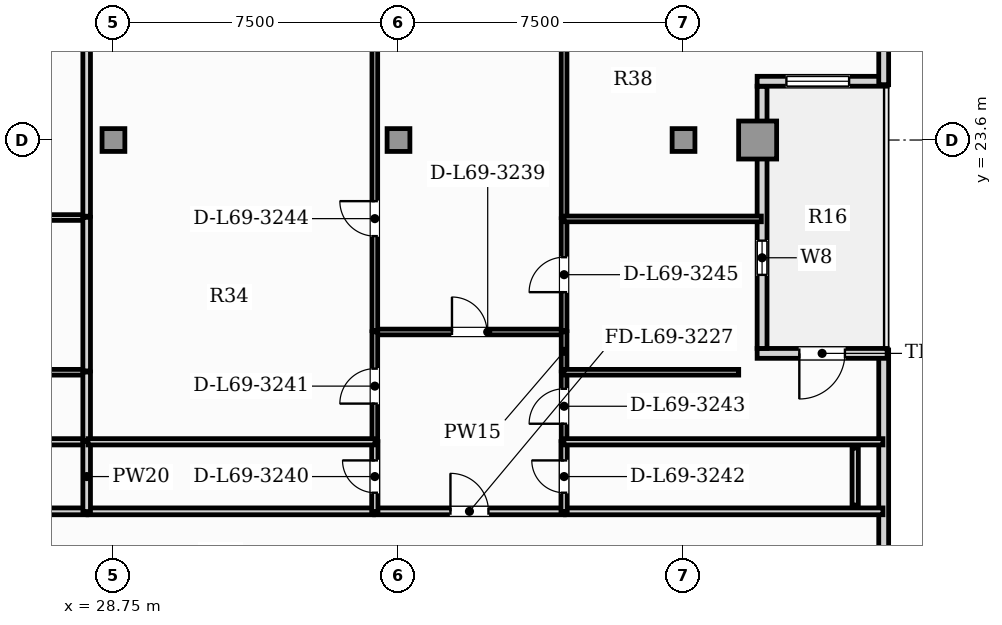
"""IFC4 building model, lengths in metres.
Left out: names, types, materials, properties, quantities, classifications, styles, units other than length and angle.
Written with IfcOpenShell. Run it as: python <this file> out.ifc"""

import sys

from ifc_helpers import new_model, si_unit, direction, frame, frame_2d, origin, origin_2d, place, context, subcontext, project, spatial, rectangle, hollow_rectangle, extrude, element, fill, save


model = new_model("IFC4")
c1 = context("Model", 3, precision=1e-05, world=origin(), true_north=direction((0.0, 1.0)))
c2 = subcontext(c1, "Body", "Model", "MODEL_VIEW")
j1 = project(units=[si_unit("LENGTHUNIT", "METRE"), si_unit("PLANEANGLEUNIT", "RADIAN")], contexts=[c1])
p1 = place(None, origin())
s1 = spatial("IfcSite", under=j1, at=p1, CompositionType="ELEMENT")
p2 = place(p1, origin())
s2 = spatial("IfcBuilding", under=s1, at=p2, CompositionType="ELEMENT")
p3 = place(p2, frame((0.0, 0.0, 281.05)))
s3 = spatial("IfcBuildingStorey", under=s2, at=p3, CompositionType="ELEMENT", Elevation=281.05)
p4 = place(p3, frame((45.7, 23.6, 0.0), z_axis=(0.0, 0.0, 1.0), x_axis=(1.0, 0.0, 0.0)))
e1 = element("IfcColumn", 1, at=p4, inside=s3, PredefinedType="USERDEFINED", context=c2, shape_type="SweptSolid", body=[
    extrude(hollow_rectangle(XDim=1.0, YDim=1.0, WallThickness=0.06, at=origin_2d()), origin(), (0.0, 0.0, 1.0), 3.85),
])
for number, where, z_axis, x_axis in (
    (2, (28.75, 23.6, 0.0), (0.0, 0.0, 1.0), (1.0, 0.0, 0.0)),
    (3, (36.25, 23.6, 0.0), (0.0, 0.0, 1.0), (1.0, 0.0, 0.0)),
    (4, (43.75, 23.6, 0.0), (0.0, 0.0, 1.0), (1.0, 0.0, 0.0)),
):
    element("IfcColumn", number, at=place(p3, frame(where, z_axis=z_axis, x_axis=x_axis)), inside=s3, PredefinedType="COLUMN", context=c2, shape_type="SweptSolid", body=[
        extrude(rectangle(XDim=0.6, YDim=0.6, at=origin_2d()), origin(), (0.0, 0.0, 1.0), 3.85),
    ])
p5 = place(p3, frame((49.017, 3.24, 0.0), z_axis=(0.0, 0.0, 1.0), x_axis=(0.0, 1.0, 0.0)))
e5 = element("IfcWall", 5, at=p5, inside=s3, PredefinedType="SOLIDWALL", context=c2, shape_type="SweptSolid", body=[
    extrude(rectangle(XDim=14.836, YDim=0.26, at=frame_2d((7.418, 0.0))), origin(), (0.0, 0.0, 1.0), 3.65),
])
p6 = place(p3, frame((49.107, 17.986, 0.0), z_axis=(0.0, 0.0, 1.0), x_axis=(-1.0, 0.0, 0.0)))
e6 = element("IfcWall", 6, at=p6, inside=s3, PredefinedType="SOLIDWALL", context=c2, shape_type="SweptSolid", body=[
    extrude(rectangle(XDim=3.42, YDim=0.26, at=frame_2d((1.71, 0.0))), origin(), (0.0, 0.0, 1.0), 3.65),
])
p7 = place(p6, frame((1.11, 0.0, 0.0)))
e7 = element("IfcOpeningElement", 7, at=p7, cuts=e6, PredefinedType="OPENING", context=c2, shape_type="SweptSolid", body=[
    extrude(rectangle(XDim=1.2, YDim=2.2, at=frame_2d((0.6, 1.1))), frame((0.0, 0.14, 0.0), z_axis=(0.0, -1.0, 0.0), x_axis=(1.0, 0.0, 0.0)), (0.0, 0.0, 1.0), 0.28),
])
p8 = place(p3, frame((45.817, 18.116, 0.0), z_axis=(0.0, 0.0, 1.0), x_axis=(0.0, 1.0, 0.0)))
e8 = element("IfcWall", 8, at=p8, inside=s3, PredefinedType="SOLIDWALL", context=c2, shape_type="SweptSolid", body=[
    extrude(rectangle(XDim=6.9, YDim=0.26, at=frame_2d((3.45, 0.0))), origin(), (0.0, 0.0, 1.0), 3.19),
])
p9 = place(p8, frame((1.936, 0.0, 0.85)))
e9 = element("IfcOpeningElement", 9, at=p9, cuts=e8, PredefinedType="OPENING", context=c2, shape_type="SweptSolid", body=[
    extrude(rectangle(XDim=0.9, YDim=1.4, at=frame_2d((0.45, 0.7))), frame((0.0, 0.14, 0.0), z_axis=(0.0, -1.0, 0.0), x_axis=(1.0, 0.0, 0.0)), (0.0, 0.0, 1.0), 0.28),
])
p10 = place(p3, frame((45.687, 25.146, 0.0), z_axis=(0.0, 0.0, 1.0), x_axis=(1.0, 0.0, 0.0)))
e10 = element("IfcWall", 10, at=p10, inside=s3, PredefinedType="SOLIDWALL", context=c2, shape_type="SweptSolid", body=[
    extrude(rectangle(XDim=3.42, YDim=0.26, at=frame_2d((1.71, 0.0))), origin(), (0.0, 0.0, 1.0), 3.65),
])
p11 = place(p10, frame((0.77, 0.0, 0.88)))
e11 = element("IfcOpeningElement", 11, at=p11, cuts=e10, PredefinedType="OPENING", context=c2, shape_type="SweptSolid", body=[
    extrude(rectangle(XDim=1.65, YDim=2.0, at=frame_2d((0.825, 1.0))), frame((0.0, 0.14, 0.0), z_axis=(0.0, -1.0, 0.0), x_axis=(1.0, 0.0, 0.0)), (0.0, 0.0, 1.0), 0.28),
])
p12 = place(p3, frame((49.017, 25.056, 0.0), z_axis=(0.0, 0.0, 1.0), x_axis=(0.0, 1.0, 0.0)))
e12 = element("IfcWall", 12, at=p12, inside=s3, PredefinedType="SOLIDWALL", context=c2, shape_type="SweptSolid", body=[
    extrude(rectangle(XDim=6.436, YDim=0.26, at=frame_2d((3.218, 0.0))), origin(), (0.0, 0.0, 1.0), 3.65),
])
p13 = place(p12, frame((2.244, 0.0, 0.95)))
e13 = element("IfcOpeningElement", 13, at=p13, cuts=e12, PredefinedType="OPENING", context=c2, shape_type="SweptSolid", body=[
    extrude(rectangle(XDim=0.9, YDim=1.5, at=frame_2d((0.45, 0.75))), frame((0.0, 0.14, 0.0), z_axis=(0.0, -1.0, 0.0), x_axis=(1.0, 0.0, 0.0)), (0.0, 0.0, 1.0), 0.28),
])
p14 = place(p12, frame((4.016, 0.0, 0.88)))
e14 = element("IfcOpeningElement", 14, at=p14, cuts=e12, PredefinedType="OPENING", context=c2, shape_type="SweptSolid", body=[
    extrude(rectangle(XDim=1.65, YDim=2.0, at=frame_2d((0.825, 1.0))), frame((0.0, 0.14, 0.0), z_axis=(0.0, -1.0, 0.0), x_axis=(1.0, 0.0, 0.0)), (0.0, 0.0, 1.0), 0.28),
])
p15 = place(p3, frame((21.119, 13.83, 0.0), z_axis=(0.0, 0.0, 1.0), x_axis=(1.0, 0.0, 0.0)))
e15 = element("IfcWall", 15, at=p15, inside=s3, PredefinedType="PARTITIONING", context=c2, shape_type="SweptSolid", body=[
    extrude(rectangle(XDim=6.931, YDim=0.18, at=frame_2d((3.465, 0.0))), origin(), (0.0, 0.0, 1.0), 3.65),
])
p16 = place(p3, frame((35.622, 13.83, 0.0), z_axis=(0.0, 0.0, 1.0), x_axis=(1.0, 0.0, 0.0)))
e16 = element("IfcWall", 16, at=p16, inside=s3, PredefinedType="PARTITIONING", context=c2, shape_type="SweptSolid", body=[
    extrude(rectangle(XDim=4.99, YDim=0.18, at=frame_2d((2.495, 0.0))), origin(), (0.0, 0.0, 1.0), 3.65),
])
p17 = place(p16, frame((1.995, 0.0, 0.0)))
e17 = element("IfcOpeningElement", 17, at=p17, cuts=e16, PredefinedType="OPENING", context=c2, shape_type="SweptSolid", body=[
    extrude(rectangle(XDim=1.0, YDim=2.15, at=frame_2d((0.5, 1.075))), frame((0.0, 0.1, 0.0), z_axis=(0.0, -1.0, 0.0), x_axis=(1.0, 0.0, 0.0)), (0.0, 0.0, 1.0), 0.2),
])
p18 = place(p3, frame((28.08, 13.83, 0.0), z_axis=(0.0, 0.0, 1.0), x_axis=(1.0, 0.0, 0.0)))
e18 = element("IfcWall", 18, at=p18, inside=s3, PredefinedType="PARTITIONING", context=c2, shape_type="SweptSolid", body=[
    extrude(rectangle(XDim=7.512, YDim=0.18, at=frame_2d((3.756, 0.0))), origin(), (0.0, 0.0, 1.0), 3.65),
])
p19 = place(p3, frame((40.642, 13.83, 0.0), z_axis=(0.0, 0.0, 1.0), x_axis=(1.0, 0.0, 0.0)))
e19 = element("IfcWall", 19, at=p19, inside=s3, PredefinedType="PARTITIONING", context=c2, shape_type="SweptSolid", body=[
    extrude(rectangle(XDim=8.355, YDim=0.18, at=frame_2d((4.177, 0.0))), origin(), (0.0, 0.0, 1.0), 3.65),
])
p20 = place(p3, frame((21.079, 15.66, 0.0), z_axis=(0.0, 0.0, 1.0), x_axis=(1.0, 0.0, 0.0)))
e20 = element("IfcWall", 20, at=p20, inside=s3, PredefinedType="PLUMBINGWALL", context=c2, shape_type="SweptSolid", body=[
    extrude(rectangle(XDim=6.971, YDim=0.165, at=frame_2d((3.485, 0.0))), origin(), (0.0, 0.0, 1.0), 3.65),
])
p21 = place(p3, frame((28.045, 13.825, 0.0), z_axis=(0.0, 0.0, 1.0), x_axis=(0.0, 1.0, 0.0)))
e21 = element("IfcWall", 21, at=p21, inside=s3, PredefinedType="PARTITIONING", context=c2, shape_type="SweptSolid", body=[
    extrude(rectangle(XDim=1.84, YDim=0.2, at=frame_2d((0.92, 0.0))), origin(), (0.0, 0.0, 1.0), 3.65),
])
p22 = place(p3, frame((21.079, 17.49, 0.0), z_axis=(0.0, 0.0, 1.0), x_axis=(1.0, 0.0, 0.0)))
e22 = element("IfcWall", 22, at=p22, inside=s3, PredefinedType="PARTITIONING", context=c2, shape_type="SweptSolid", body=[
    extrude(rectangle(XDim=6.971, YDim=0.15, at=frame_2d((3.485, 0.0))), origin(), (0.0, 0.0, 1.0), 3.65),
])
p23 = place(p3, frame((28.045, 15.695, 0.0), z_axis=(0.0, 0.0, 1.0), x_axis=(0.0, 1.0, 0.0)))
e23 = element("IfcWall", 23, at=p23, inside=s3, PredefinedType="PARTITIONING", context=c2, shape_type="SweptSolid", body=[
    extrude(rectangle(XDim=1.8, YDim=0.2, at=frame_2d((0.9, 0.0))), origin(), (0.0, 0.0, 1.0), 3.65),
])
p24 = place(p3, frame((21.079, 21.561, 0.0), z_axis=(0.0, 0.0, 1.0), x_axis=(1.0, 0.0, 0.0)))
e24 = element("IfcWall", 24, at=p24, inside=s3, PredefinedType="PARTITIONING", context=c2, shape_type="SweptSolid", body=[
    extrude(rectangle(XDim=6.971, YDim=0.15, at=frame_2d((3.485, 0.0))), origin(), (0.0, 0.0, 1.0), 3.65),
])
p25 = place(p3, frame((28.045, 17.525, 0.0), z_axis=(0.0, 0.0, 1.0), x_axis=(0.0, 1.0, 0.0)))
e25 = element("IfcWall", 25, at=p25, inside=s3, PredefinedType="PARTITIONING", context=c2, shape_type="SweptSolid", body=[
    extrude(rectangle(XDim=4.041, YDim=0.2, at=frame_2d((2.021, 0.0))), origin(), (0.0, 0.0, 1.0), 3.65),
])
p26 = place(p3, frame((28.045, 21.596, 0.0), z_axis=(0.0, 0.0, 1.0), x_axis=(0.0, 1.0, 0.0)))
e26 = element("IfcWall", 26, at=p26, inside=s3, PredefinedType="PARTITIONING", context=c2, shape_type="SweptSolid", body=[
    extrude(rectangle(XDim=5.369, YDim=0.2, at=frame_2d((2.685, 0.0))), origin(), (0.0, 0.0, 1.0), 3.65),
])
p27 = place(p3, frame((35.622, 18.55, 0.0), z_axis=(0.0, 0.0, 1.0), x_axis=(1.0, 0.0, 0.0)))
e27 = element("IfcWall", 27, at=p27, inside=s3, PredefinedType="PARTITIONING", context=c2, shape_type="SweptSolid", body=[
    extrude(rectangle(XDim=4.99, YDim=0.15, at=frame_2d((2.495, 0.0))), origin(), (0.0, 0.0, 1.0), 3.65),
])
p28 = place(p27, frame((2.035, 0.0, 0.0)))
e28 = element("IfcOpeningElement", 28, at=p28, cuts=e27, PredefinedType="OPENING", context=c2, shape_type="SweptSolid", body=[
    extrude(rectangle(XDim=0.92, YDim=2.1, at=frame_2d((0.46, 1.05))), frame((0.0, 0.085, 0.0), z_axis=(0.0, -1.0, 0.0), x_axis=(1.0, 0.0, 0.0)), (0.0, 0.0, 1.0), 0.17),
])
p29 = place(p3, frame((35.627, 13.825, 0.0), z_axis=(0.0, 0.0, 1.0), x_axis=(0.0, 1.0, 0.0)))
e29 = element("IfcWall", 29, at=p29, inside=s3, PredefinedType="PLUMBINGWALL", context=c2, shape_type="SweptSolid", body=[
    extrude(rectangle(XDim=1.84, YDim=0.165, at=frame_2d((0.92, 0.0))), origin(), (0.0, 0.0, 1.0), 3.65),
])
p30 = place(p29, frame((0.495, 0.0, 0.0)))
e30 = element("IfcOpeningElement", 30, at=p30, cuts=e29, PredefinedType="OPENING", context=c2, shape_type="SweptSolid", body=[
    extrude(rectangle(XDim=0.85, YDim=2.1, at=frame_2d((0.425, 1.05))), frame((0.0, 0.093, 0.0), z_axis=(0.0, -1.0, 0.0), x_axis=(1.0, 0.0, 0.0)), (0.0, 0.0, 1.0), 0.185),
])
p31 = place(p3, frame((35.627, 15.695, 0.0), z_axis=(0.0, 0.0, 1.0), x_axis=(0.0, 1.0, 0.0)))
e31 = element("IfcWall", 31, at=p31, inside=s3, PredefinedType="PARTITIONING", context=c2, shape_type="SweptSolid", body=[
    extrude(rectangle(XDim=2.859, YDim=0.15, at=frame_2d((1.43, 0.0))), origin(), (0.0, 0.0, 1.0), 3.65),
])
p32 = place(p31, frame((0.97, 0.0, 0.0)))
e32 = element("IfcOpeningElement", 32, at=p32, cuts=e31, PredefinedType="OPENING", context=c2, shape_type="SweptSolid", body=[
    extrude(rectangle(XDim=0.92, YDim=2.1, at=frame_2d((0.46, 1.05))), frame((0.0, 0.085, 0.0), z_axis=(0.0, -1.0, 0.0), x_axis=(1.0, 0.0, 0.0)), (0.0, 0.0, 1.0), 0.17),
])
p33 = place(p3, frame((40.607, 13.825, 0.0), z_axis=(0.0, 0.0, 1.0), x_axis=(0.0, 1.0, 0.0)))
e33 = element("IfcWall", 33, at=p33, inside=s3, PredefinedType="PLUMBINGWALL", context=c2, shape_type="SweptSolid", body=[
    extrude(rectangle(XDim=1.84, YDim=0.165, at=frame_2d((0.92, 0.0))), origin(), (0.0, 0.0, 1.0), 3.65),
])
p34 = place(p33, frame((0.495, 0.0, 0.0)))
e34 = element("IfcOpeningElement", 34, at=p34, cuts=e33, PredefinedType="OPENING", context=c2, shape_type="SweptSolid", body=[
    extrude(rectangle(XDim=0.85, YDim=2.1, at=frame_2d((0.425, 1.05))), frame((0.0, 0.093, 0.0), z_axis=(0.0, -1.0, 0.0), x_axis=(1.0, 0.0, 0.0)), (0.0, 0.0, 1.0), 0.185),
])
p35 = place(p3, frame((40.607, 15.695, 0.0), z_axis=(0.0, 0.0, 1.0), x_axis=(0.0, 1.0, 0.0)))
e35 = element("IfcWall", 35, at=p35, inside=s3, PredefinedType="PARTITIONING", context=c2, shape_type="SweptSolid", body=[
    extrude(rectangle(XDim=1.8, YDim=0.15, at=frame_2d((0.9, 0.0))), origin(), (0.0, 0.0, 1.0), 3.65),
])
p36 = place(p35, frame((0.44, 0.0, 0.0)))
e36 = element("IfcOpeningElement", 36, at=p36, cuts=e35, PredefinedType="OPENING", context=c2, shape_type="SweptSolid", body=[
    extrude(rectangle(XDim=0.92, YDim=2.1, at=frame_2d((0.46, 1.05))), frame((0.0, 0.085, 0.0), z_axis=(0.0, -1.0, 0.0), x_axis=(1.0, 0.0, 0.0)), (0.0, 0.0, 1.0), 0.17),
])
p37 = place(p3, frame((40.607, 17.525, 0.0), z_axis=(0.0, 0.0, 1.0), x_axis=(0.0, 1.0, 0.0)))
e37 = element("IfcWall", 37, at=p37, inside=s3, PredefinedType="PARTITIONING", context=c2, shape_type="SweptSolid", body=[
    extrude(rectangle(XDim=1.03, YDim=0.15, at=frame_2d((0.515, 0.0))), origin(), (0.0, 0.0, 1.0), 3.65),
])
p38 = place(p3, frame((35.627, 18.584, 0.0), z_axis=(0.0, 0.0, 1.0), x_axis=(0.0, 1.0, 0.0)))
e38 = element("IfcWall", 38, at=p38, inside=s3, PredefinedType="PARTITIONING", context=c2, shape_type="SweptSolid", body=[
    extrude(rectangle(XDim=8.42, YDim=0.15, at=frame_2d((4.21, 0.0))), origin(), (0.0, 0.0, 1.0), 3.65),
])
p39 = place(p38, frame((2.487, 0.0, 0.0)))
e39 = element("IfcOpeningElement", 39, at=p39, cuts=e38, PredefinedType="OPENING", context=c2, shape_type="SweptSolid", body=[
    extrude(rectangle(XDim=0.92, YDim=2.1, at=frame_2d((0.46, 1.05))), frame((0.0, 0.085, 0.0), z_axis=(0.0, -1.0, 0.0), x_axis=(1.0, 0.0, 0.0)), (0.0, 0.0, 1.0), 0.17),
])
p40 = place(p3, frame((40.607, 18.584, 0.0), z_axis=(0.0, 0.0, 1.0), x_axis=(0.0, 1.0, 0.0)))
e40 = element("IfcWall", 40, at=p40, inside=s3, PredefinedType="PARTITIONING", context=c2, shape_type="SweptSolid", body=[
    extrude(rectangle(XDim=2.945, YDim=0.15, at=frame_2d((1.473, 0.0))), origin(), (0.0, 0.0, 1.0), 3.65),
])
p41 = place(p40, frame((1.012, 0.0, 0.0)))
e41 = element("IfcOpeningElement", 41, at=p41, cuts=e40, PredefinedType="OPENING", context=c2, shape_type="SweptSolid", body=[
    extrude(rectangle(XDim=0.92, YDim=2.1, at=frame_2d((0.46, 1.05))), frame((0.0, 0.085, 0.0), z_axis=(0.0, -1.0, 0.0), x_axis=(1.0, 0.0, 0.0)), (0.0, 0.0, 1.0), 0.17),
])
p42 = place(p3, frame((40.607, 21.56, 0.0), z_axis=(0.0, 0.0, 1.0), x_axis=(0.0, 1.0, 0.0)))
e42 = element("IfcWall", 42, at=p42, inside=s3, PredefinedType="PARTITIONING", context=c2, shape_type="SweptSolid", body=[
    extrude(rectangle(XDim=5.445, YDim=0.15, at=frame_2d((2.723, 0.0))), origin(), (0.0, 0.0, 1.0), 3.65),
])
p43 = place(p3, frame((28.08, 15.66, 0.0), z_axis=(0.0, 0.0, 1.0), x_axis=(1.0, 0.0, 0.0)))
e43 = element("IfcWall", 43, at=p43, inside=s3, PredefinedType="PLUMBINGWALL", context=c2, shape_type="SweptSolid", body=[
    extrude(rectangle(XDim=7.552, YDim=0.165, at=frame_2d((3.776, 0.0))), origin(), (0.0, 0.0, 1.0), 3.65),
])
p44 = place(p3, frame((40.602, 15.66, 0.0), z_axis=(0.0, 0.0, 1.0), x_axis=(1.0, 0.0, 0.0)))
e44 = element("IfcWall", 44, at=p44, inside=s3, PredefinedType="PLUMBINGWALL", context=c2, shape_type="SweptSolid", body=[
    extrude(rectangle(XDim=8.395, YDim=0.165, at=frame_2d((4.198, 0.0))), origin(), (0.0, 0.0, 1.0), 3.65),
])
p45 = place(p3, frame((40.602, 17.49, 0.0), z_axis=(0.0, 0.0, 1.0), x_axis=(1.0, 0.0, 0.0)))
e45 = element("IfcWall", 45, at=p45, inside=s3, PredefinedType="PARTITIONING", context=c2, shape_type="SweptSolid", body=[
    extrude(rectangle(XDim=4.6, YDim=0.15, at=frame_2d((2.3, 0.0))), origin(), (0.0, 0.0, 1.0), 3.65),
])
p46 = place(p3, frame((40.602, 21.525, 0.0), z_axis=(0.0, 0.0, 1.0), x_axis=(1.0, 0.0, 0.0)))
e46 = element("IfcWall", 46, at=p46, inside=s3, PredefinedType="PARTITIONING", context=c2, shape_type="SweptSolid", body=[
    extrude(rectangle(XDim=5.195, YDim=0.15, at=frame_2d((2.598, 0.0))), origin(), (0.0, 0.0, 1.0), 3.65),
])
p47 = place(p3, frame((48.267, 15.495, 0.0), z_axis=(0.0, 0.0, 1.0), x_axis=(0.0, -1.0, 0.0)))
e47 = element("IfcWall", 47, at=p47, inside=s3, PredefinedType="PLUMBINGWALL", context=c2, shape_type="SweptSolid", body=[
    extrude(rectangle(XDim=1.5, YDim=0.165, at=frame_2d((0.75, 0.0))), origin(), (0.0, 0.0, 1.0), 3.65),
])
p48 = place(p7, frame((1.2, 0.0, 0.0), z_axis=(0.0, 0.0, 1.0), x_axis=(-1.0, 0.0, 0.0)))
e48 = element("IfcDoor", 48, at=p48, inside=s3, OperationType="SINGLE_SWING_LEFT", PredefinedType="DOOR", context=c2, shape_type="SweptSolid", body=[
    extrude(rectangle(XDim=1.2, YDim=2.2, at=frame_2d((0.6, 1.1))), frame((0.0, 0.025, 0.0), z_axis=(0.0, -1.0, 0.0), x_axis=(1.0, 0.0, 0.0)), (0.0, 0.0, 1.0), 0.05),
])
fill(e7, e48)
p49 = place(p9, origin())
e49 = element("IfcWindow", 49, at=p49, inside=s3, PartitioningType="SINGLE_PANEL", PredefinedType="WINDOW", context=c2, shape_type="SweptSolid", body=[
    extrude(rectangle(XDim=0.9, YDim=1.4, at=frame_2d((0.45, 0.7))), frame((0.0, 0.03, 0.0), z_axis=(0.0, -1.0, 0.0), x_axis=(1.0, 0.0, 0.0)), (0.0, 0.0, 1.0), 0.06),
])
fill(e9, e49)
p50 = place(p11, origin())
e50 = element("IfcWindow", 50, at=p50, inside=s3, PartitioningType="SINGLE_PANEL", PredefinedType="WINDOW", context=c2, shape_type="SweptSolid", body=[
    extrude(rectangle(XDim=1.65, YDim=2.0, at=frame_2d((0.825, 1.0))), frame((0.0, 0.03, 0.0), z_axis=(0.0, -1.0, 0.0), x_axis=(1.0, 0.0, 0.0)), (0.0, 0.0, 1.0), 0.06),
])
fill(e11, e50)
p51 = place(p17, origin())
e51 = element("IfcDoor", 51, at=p51, inside=s3, OperationType="SINGLE_SWING_LEFT", PredefinedType="DOOR", context=c2, shape_type="SweptSolid", body=[
    extrude(rectangle(XDim=1.0, YDim=2.15, at=frame_2d((0.5, 1.075))), frame((0.0, 0.025, 0.0), z_axis=(0.0, -1.0, 0.0), x_axis=(1.0, 0.0, 0.0)), (0.0, 0.0, 1.0), 0.05),
])
fill(e17, e51)
p52 = place(p28, origin())
e52 = element("IfcDoor", 52, at=p52, inside=s3, OperationType="SINGLE_SWING_LEFT", PredefinedType="DOOR", context=c2, shape_type="SweptSolid", body=[
    extrude(rectangle(XDim=0.92, YDim=2.1, at=frame_2d((0.46, 1.05))), frame((0.0, 0.025, 0.0), z_axis=(0.0, -1.0, 0.0), x_axis=(1.0, 0.0, 0.0)), (0.0, 0.0, 1.0), 0.05),
])
fill(e28, e52)
p53 = place(p30, origin())
e53 = element("IfcDoor", 53, at=p53, inside=s3, OperationType="SINGLE_SWING_RIGHT", PredefinedType="DOOR", context=c2, shape_type="SweptSolid", body=[
    extrude(rectangle(XDim=0.85, YDim=2.1, at=frame_2d((0.425, 1.05))), frame((0.0, 0.025, 0.0), z_axis=(0.0, -1.0, 0.0), x_axis=(1.0, 0.0, 0.0)), (0.0, 0.0, 1.0), 0.05),
])
fill(e30, e53)
p54 = place(p32, origin())
e54 = element("IfcDoor", 54, at=p54, inside=s3, OperationType="SINGLE_SWING_LEFT", PredefinedType="DOOR", context=c2, shape_type="SweptSolid", body=[
    extrude(rectangle(XDim=0.92, YDim=2.1, at=frame_2d((0.46, 1.05))), frame((0.0, 0.025, 0.0), z_axis=(0.0, -1.0, 0.0), x_axis=(1.0, 0.0, 0.0)), (0.0, 0.0, 1.0), 0.05),
])
fill(e32, e54)
p55 = place(p34, origin())
e55 = element("IfcDoor", 55, at=p55, inside=s3, OperationType="SINGLE_SWING_RIGHT", PredefinedType="DOOR", context=c2, shape_type="SweptSolid", body=[
    extrude(rectangle(XDim=0.85, YDim=2.1, at=frame_2d((0.425, 1.05))), frame((0.0, 0.025, 0.0), z_axis=(0.0, -1.0, 0.0), x_axis=(1.0, 0.0, 0.0)), (0.0, 0.0, 1.0), 0.05),
])
fill(e34, e55)
p56 = place(p36, origin())
e56 = element("IfcDoor", 56, at=p56, inside=s3, OperationType="SINGLE_SWING_LEFT", PredefinedType="DOOR", context=c2, shape_type="SweptSolid", body=[
    extrude(rectangle(XDim=0.92, YDim=2.1, at=frame_2d((0.46, 1.05))), frame((0.0, 0.025, 0.0), z_axis=(0.0, -1.0, 0.0), x_axis=(1.0, 0.0, 0.0)), (0.0, 0.0, 1.0), 0.05),
])
fill(e36, e56)
p57 = place(p39, origin())
e57 = element("IfcDoor", 57, at=p57, inside=s3, OperationType="SINGLE_SWING_RIGHT", PredefinedType="DOOR", context=c2, shape_type="SweptSolid", body=[
    extrude(rectangle(XDim=0.92, YDim=2.1, at=frame_2d((0.46, 1.05))), frame((0.0, 0.025, 0.0), z_axis=(0.0, -1.0, 0.0), x_axis=(1.0, 0.0, 0.0)), (0.0, 0.0, 1.0), 0.05),
])
fill(e39, e57)
p58 = place(p41, origin())
e58 = element("IfcDoor", 58, at=p58, inside=s3, OperationType="SINGLE_SWING_LEFT", PredefinedType="DOOR", context=c2, shape_type="SweptSolid", body=[
    extrude(rectangle(XDim=0.92, YDim=2.1, at=frame_2d((0.46, 1.05))), frame((0.0, 0.025, 0.0), z_axis=(0.0, -1.0, 0.0), x_axis=(1.0, 0.0, 0.0)), (0.0, 0.0, 1.0), 0.05),
])
fill(e41, e58)
save(model, sys.argv[1])
